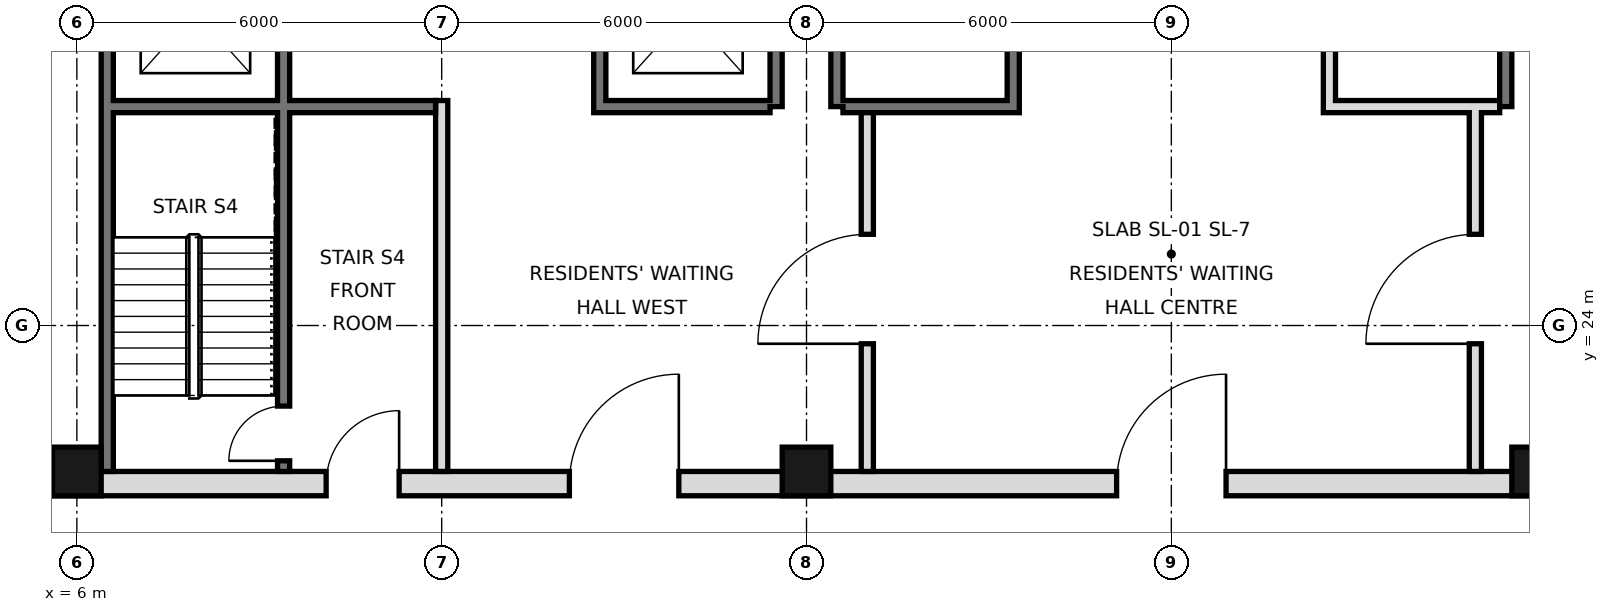
"""IFC4 building model, lengths in metres.
Left out: names, types, materials, properties, quantities, classifications, styles, units other than length and angle.
Written with IfcOpenShell. Run it as: python <this file> out.ifc"""

import sys

from ifc_helpers import new_model, si_unit, direction, frame, frame_2d, origin, origin_2d, place, context, subcontext, project, spatial, rectangle, hollow_rectangle, extrude, element, fill, save


model = new_model("IFC4")
c1 = context("Model", 3, precision=1e-05, world=origin(), true_north=direction((0.0, 1.0)))
c2 = subcontext(c1, "Body", "Model", "MODEL_VIEW")
j1 = project(units=[si_unit("LENGTHUNIT", "METRE"), si_unit("PLANEANGLEUNIT", "RADIAN")], contexts=[c1])
p1 = place(None, origin())
s1 = spatial("IfcSite", under=j1, at=p1, CompositionType="ELEMENT")
p2 = place(p1, origin())
s2 = spatial("IfcBuilding", under=s1, at=p2, CompositionType="ELEMENT")
p3 = place(p2, frame((0.0, 0.0, 130.4)))
s3 = spatial("IfcBuildingStorey", under=s2, at=p3, CompositionType="ELEMENT", Elevation=130.4)
for number, where, z_axis, x_axis in (
    (1, (6.0, 21.6, 0.0), (0.0, 0.0, 1.0), (1.0, 0.0, 0.0)),
    (2, (18.0, 21.6, 0.0), (0.0, 0.0, 1.0), (1.0, 0.0, 0.0)),
    (3, (30.0, 21.6, 0.0), (0.0, 0.0, 1.0), (1.0, 0.0, 0.0)),
):
    element("IfcColumn", number, at=place(p3, frame(where, z_axis=z_axis, x_axis=x_axis)), inside=s3, PredefinedType="COLUMN", context=c2, shape_type="SweptSolid", body=[
        extrude(hollow_rectangle(XDim=0.8, YDim=0.8, WallThickness=0.05, at=origin_2d()), origin(), (0.0, 0.0, 1.0), 3.6),
    ])
p4 = place(p3, frame((6.5, 21.6, 0.0), z_axis=(0.0, 0.0, 1.0), x_axis=(0.0, 1.0, 0.0)))
e4 = element("IfcWall", 4, at=p4, inside=s3, PredefinedType="SOLIDWALL", context=c2, shape_type="SweptSolid", body=[
    extrude(rectangle(XDim=23.5, YDim=0.2, at=frame_2d((11.75, 0.0))), origin(), (0.0, 0.0, 1.0), 3.42),
])
for number, where, z_axis, x_axis in (
    (5, (17.5, 27.6, 0.0), (0.0, 0.0, 1.0), (0.0, 1.0, 0.0)),
    (6, (18.5, 27.6, 0.0), (0.0, 0.0, 1.0), (0.0, 1.0, 0.0)),
    (7, (29.5, 27.6, 0.0), (0.0, 0.0, 1.0), (0.0, 1.0, 0.0)),
):
    element("IfcWall", number, at=place(p3, frame(where, z_axis=z_axis, x_axis=x_axis)), inside=s3, PredefinedType="SOLIDWALL", context=c2, shape_type="SweptSolid", body=[
        extrude(rectangle(XDim=17.5, YDim=0.2, at=frame_2d((8.75, 0.0))), origin(), (0.0, 0.0, 1.0), 3.42),
    ])
p5 = place(p3, frame((5.6, 21.4, 0.0), z_axis=(0.0, 0.0, 1.0), x_axis=(1.0, 0.0, 0.0)))
e8 = element("IfcWall", 8, at=p5, inside=s3, PredefinedType="SOLIDWALL", context=c2, shape_type="SweptSolid", body=[
    extrude(rectangle(XDim=36.8, YDim=0.4, at=frame_2d((18.4, 0.0))), origin(), (0.0, 0.0, 1.0), 3.42),
])
p6 = place(p5, frame((8.5, 0.0, 0.0)))
e9 = element("IfcOpeningElement", 9, at=p6, cuts=e8, PredefinedType="OPENING", context=c2, shape_type="SweptSolid", body=[
    extrude(rectangle(XDim=1.8, YDim=2.1, at=frame_2d((0.9, 1.05))), frame((0.0, 0.21, 0.0), z_axis=(0.0, -1.0, 0.0), x_axis=(1.0, 0.0, 0.0)), (0.0, 0.0, 1.0), 0.42),
])
p7 = place(p5, frame((17.5, 0.0, 0.0)))
e10 = element("IfcOpeningElement", 10, at=p7, cuts=e8, PredefinedType="OPENING", context=c2, shape_type="SweptSolid", body=[
    extrude(rectangle(XDim=1.8, YDim=2.1, at=frame_2d((0.9, 1.05))), frame((0.0, 0.21, 0.0), z_axis=(0.0, -1.0, 0.0), x_axis=(1.0, 0.0, 0.0)), (0.0, 0.0, 1.0), 0.42),
])
p8 = place(p5, frame((26.5, 0.0, 0.0)))
e11 = element("IfcOpeningElement", 11, at=p8, cuts=e8, PredefinedType="OPENING", context=c2, shape_type="SweptSolid", body=[
    extrude(rectangle(XDim=1.8, YDim=2.1, at=frame_2d((0.9, 1.05))), frame((0.0, 0.21, 0.0), z_axis=(0.0, -1.0, 0.0), x_axis=(1.0, 0.0, 0.0)), (0.0, 0.0, 1.0), 0.42),
])
p9 = place(p5, frame((4.5, 0.0, 0.0)))
e12 = element("IfcOpeningElement", 12, at=p9, cuts=e8, PredefinedType="OPENING", context=c2, shape_type="SweptSolid", body=[
    extrude(rectangle(XDim=1.2, YDim=2.1, at=frame_2d((0.6, 1.05))), frame((0.0, 0.21, 0.0), z_axis=(0.0, -1.0, 0.0), x_axis=(1.0, 0.0, 0.0)), (0.0, 0.0, 1.0), 0.42),
])
p10 = place(p5, frame((31.1, 0.0, 0.0)))
e13 = element("IfcOpeningElement", 13, at=p10, cuts=e8, PredefinedType="OPENING", context=c2, shape_type="SweptSolid", body=[
    extrude(rectangle(XDim=1.2, YDim=2.1, at=frame_2d((0.6, 1.05))), frame((0.0, 0.21, 0.0), z_axis=(0.0, -1.0, 0.0), x_axis=(1.0, 0.0, 0.0)), (0.0, 0.0, 1.0), 0.42),
])
p11 = place(p3, frame((19.0, 21.6, 0.0), z_axis=(0.0, 0.0, 1.0), x_axis=(0.0, 1.0, 0.0)))
e14 = element("IfcWall", 14, at=p11, inside=s3, PredefinedType="PARTITIONING", context=c2, shape_type="SweptSolid", body=[
    extrude(rectangle(XDim=6.0, YDim=0.2, at=frame_2d((3.0, 0.0))), origin(), (0.0, 0.0, 1.0), 3.42),
])
p12 = place(p11, frame((2.1, 0.0, 0.0)))
e15 = element("IfcOpeningElement", 15, at=p12, cuts=e14, PredefinedType="OPENING", context=c2, shape_type="SweptSolid", body=[
    extrude(rectangle(XDim=1.8, YDim=2.1, at=frame_2d((0.9, 1.05))), frame((0.0, 0.11, 0.0), z_axis=(0.0, -1.0, 0.0), x_axis=(1.0, 0.0, 0.0)), (0.0, 0.0, 1.0), 0.22),
])
p13 = place(p3, frame((29.0, 21.6, 0.0), z_axis=(0.0, 0.0, 1.0), x_axis=(0.0, 1.0, 0.0)))
e16 = element("IfcWall", 16, at=p13, inside=s3, PredefinedType="PARTITIONING", context=c2, shape_type="SweptSolid", body=[
    extrude(rectangle(XDim=6.0, YDim=0.2, at=frame_2d((3.0, 0.0))), origin(), (0.0, 0.0, 1.0), 3.42),
])
p14 = place(p13, frame((2.1, 0.0, 0.0)))
e17 = element("IfcOpeningElement", 17, at=p14, cuts=e16, PredefinedType="OPENING", context=c2, shape_type="SweptSolid", body=[
    extrude(rectangle(XDim=1.8, YDim=2.1, at=frame_2d((0.9, 1.05))), frame((0.0, 0.11, 0.0), z_axis=(0.0, -1.0, 0.0), x_axis=(1.0, 0.0, 0.0)), (0.0, 0.0, 1.0), 0.22),
])
p15 = place(p3, frame((12.0, 21.6, 0.0), z_axis=(0.0, 0.0, 1.0), x_axis=(0.0, 1.0, 0.0)))
e18 = element("IfcWall", 18, at=p15, inside=s3, PredefinedType="PARTITIONING", context=c2, shape_type="SweptSolid", body=[
    extrude(rectangle(XDim=6.1, YDim=0.2, at=frame_2d((3.05, 0.0))), origin(), (0.0, 0.0, 1.0), 3.42),
])
p16 = place(p3, frame((14.6, 27.5, 0.0), z_axis=(0.0, 0.0, 1.0), x_axis=(0.0, 1.0, 0.0)))
e19 = element("IfcWall", 19, at=p16, inside=s3, PredefinedType="SOLIDWALL", context=c2, shape_type="SweptSolid", body=[
    extrude(rectangle(XDim=17.5, YDim=0.2, at=frame_2d((8.75, 0.0))), origin(), (0.0, 0.0, 1.0), 3.42),
])
p17 = place(p16, frame((1.1, 0.0, 0.0)))
e20 = element("IfcOpeningElement", 20, at=p17, cuts=e19, PredefinedType="OPENING", context=c2, shape_type="SweptSolid", body=[
    extrude(rectangle(XDim=1.1, YDim=2.1, at=frame_2d((0.55, 1.05))), frame((0.0, 0.11, 0.0), z_axis=(0.0, -1.0, 0.0), x_axis=(1.0, 0.0, 0.0)), (0.0, 0.0, 1.0), 0.22),
])
p18 = place(p16, frame((4.2, 0.0, 0.0)))
e21 = element("IfcOpeningElement", 21, at=p18, cuts=e19, PredefinedType="OPENING", context=c2, shape_type="SweptSolid", body=[
    extrude(rectangle(XDim=1.1, YDim=2.1, at=frame_2d((0.55, 1.05))), frame((0.0, 0.11, 0.0), z_axis=(0.0, -1.0, 0.0), x_axis=(1.0, 0.0, 0.0)), (0.0, 0.0, 1.0), 0.22),
])
p19 = place(p16, frame((15.4, 0.0, 0.0)))
e22 = element("IfcOpeningElement", 22, at=p19, cuts=e19, PredefinedType="OPENING", context=c2, shape_type="SweptSolid", body=[
    extrude(rectangle(XDim=1.1, YDim=2.1, at=frame_2d((0.55, 1.05))), frame((0.0, 0.11, 0.0), z_axis=(0.0, -1.0, 0.0), x_axis=(1.0, 0.0, 0.0)), (0.0, 0.0, 1.0), 0.22),
])
p20 = place(p16, frame((9.9, 0.0, 0.0)))
e23 = element("IfcOpeningElement", 23, at=p20, cuts=e19, PredefinedType="OPENING", context=c2, shape_type="SweptSolid", body=[
    extrude(rectangle(XDim=0.9, YDim=2.1, at=frame_2d((0.45, 1.05))), frame((0.0, 0.11, 0.0), z_axis=(0.0, -1.0, 0.0), x_axis=(1.0, 0.0, 0.0)), (0.0, 0.0, 1.0), 0.22),
])
p21 = place(p3, frame((21.4, 27.5, 0.0), z_axis=(0.0, 0.0, 1.0), x_axis=(0.0, 1.0, 0.0)))
e24 = element("IfcWall", 24, at=p21, inside=s3, PredefinedType="SOLIDWALL", context=c2, shape_type="SweptSolid", body=[
    extrude(rectangle(XDim=17.5, YDim=0.2, at=frame_2d((8.75, 0.0))), origin(), (0.0, 0.0, 1.0), 3.42),
])
p22 = place(p21, frame((16.2, 0.0, 0.0)))
e25 = element("IfcOpeningElement", 25, at=p22, cuts=e24, PredefinedType="OPENING", context=c2, shape_type="SweptSolid", body=[
    extrude(rectangle(XDim=1.0, YDim=2.1, at=frame_2d((0.5, 1.05))), frame((0.0, 0.11, 0.0), z_axis=(0.0, -1.0, 0.0), x_axis=(1.0, 0.0, 0.0)), (0.0, 0.0, 1.0), 0.22),
])
p23 = place(p21, frame((7.4, 0.0, 0.0)))
e26 = element("IfcOpeningElement", 26, at=p23, cuts=e24, PredefinedType="OPENING", context=c2, shape_type="SweptSolid", body=[
    extrude(rectangle(XDim=0.9, YDim=2.1, at=frame_2d((0.45, 1.05))), frame((0.0, 0.11, 0.0), z_axis=(0.0, -1.0, 0.0), x_axis=(1.0, 0.0, 0.0)), (0.0, 0.0, 1.0), 0.22),
])
p24 = place(p3, frame((26.6, 27.5, 0.0), z_axis=(0.0, 0.0, 1.0), x_axis=(0.0, 1.0, 0.0)))
e27 = element("IfcWall", 27, at=p24, inside=s3, PredefinedType="SOLIDWALL", context=c2, shape_type="SweptSolid", body=[
    extrude(rectangle(XDim=17.5, YDim=0.2, at=frame_2d((8.75, 0.0))), origin(), (0.0, 0.0, 1.0), 3.42),
])
p25 = place(p24, frame((4.3, 0.0, 0.0)))
e28 = element("IfcOpeningElement", 28, at=p25, cuts=e27, PredefinedType="OPENING", context=c2, shape_type="SweptSolid", body=[
    extrude(rectangle(XDim=0.9, YDim=2.1, at=frame_2d((0.45, 1.05))), frame((0.0, 0.11, 0.0), z_axis=(0.0, -1.0, 0.0), x_axis=(1.0, 0.0, 0.0)), (0.0, 0.0, 1.0), 0.22),
])
p26 = place(p24, frame((10.35, 0.0, 0.0)))
e29 = element("IfcOpeningElement", 29, at=p26, cuts=e27, PredefinedType="OPENING", context=c2, shape_type="SweptSolid", body=[
    extrude(rectangle(XDim=1.0, YDim=2.1, at=frame_2d((0.5, 1.05))), frame((0.0, 0.11, 0.0), z_axis=(0.0, -1.0, 0.0), x_axis=(1.0, 0.0, 0.0)), (0.0, 0.0, 1.0), 0.22),
])
p27 = place(p24, frame((15.475, 0.0, 0.0)))
e30 = element("IfcOpeningElement", 30, at=p27, cuts=e27, PredefinedType="OPENING", context=c2, shape_type="SweptSolid", body=[
    extrude(rectangle(XDim=1.0, YDim=2.1, at=frame_2d((0.5, 1.05))), frame((0.0, 0.11, 0.0), z_axis=(0.0, -1.0, 0.0), x_axis=(1.0, 0.0, 0.0)), (0.0, 0.0, 1.0), 0.22),
])
p28 = place(p3, frame((9.4, 21.6, 0.0), z_axis=(0.0, 0.0, 1.0), x_axis=(0.0, 1.0, 0.0)))
e31 = element("IfcWall", 31, at=p28, inside=s3, PredefinedType="SOLIDWALL", context=c2, shape_type="SweptSolid", body=[
    extrude(rectangle(XDim=23.4, YDim=0.2, at=frame_2d((11.7, 0.0))), origin(), (0.0, 0.0, 1.0), 3.42),
])
p29 = place(p28, frame((7.0, 0.0, 0.0)))
e32 = element("IfcOpeningElement", 32, at=p29, cuts=e31, PredefinedType="OPENING", context=c2, shape_type="SweptSolid", body=[
    extrude(rectangle(XDim=1.1, YDim=2.1, at=frame_2d((0.55, 1.05))), frame((0.0, 0.11, 0.0), z_axis=(0.0, -1.0, 0.0), x_axis=(1.0, 0.0, 0.0)), (0.0, 0.0, 1.0), 0.22),
])
p30 = place(p28, frame((10.1, 0.0, 0.0)))
e33 = element("IfcOpeningElement", 33, at=p30, cuts=e31, PredefinedType="OPENING", context=c2, shape_type="SweptSolid", body=[
    extrude(rectangle(XDim=1.1, YDim=2.1, at=frame_2d((0.55, 1.05))), frame((0.0, 0.11, 0.0), z_axis=(0.0, -1.0, 0.0), x_axis=(1.0, 0.0, 0.0)), (0.0, 0.0, 1.0), 0.22),
])
p31 = place(p28, frame((13.2, 0.0, 0.0)))
e34 = element("IfcOpeningElement", 34, at=p31, cuts=e31, PredefinedType="OPENING", context=c2, shape_type="SweptSolid", body=[
    extrude(rectangle(XDim=1.1, YDim=2.1, at=frame_2d((0.55, 1.05))), frame((0.0, 0.11, 0.0), z_axis=(0.0, -1.0, 0.0), x_axis=(1.0, 0.0, 0.0)), (0.0, 0.0, 1.0), 0.22),
])
p32 = place(p28, frame((22.1, 0.0, 0.0)))
e35 = element("IfcOpeningElement", 35, at=p32, cuts=e31, PredefinedType="OPENING", context=c2, shape_type="SweptSolid", body=[
    extrude(rectangle(XDim=1.0, YDim=2.1, at=frame_2d((0.5, 1.05))), frame((0.0, 0.11, 0.0), z_axis=(0.0, -1.0, 0.0), x_axis=(1.0, 0.0, 0.0)), (0.0, 0.0, 1.0), 0.22),
])
p33 = place(p28, frame((0.175, 0.0, 0.0)))
e36 = element("IfcOpeningElement", 36, at=p33, cuts=e31, PredefinedType="OPENING", context=c2, shape_type="SweptSolid", body=[
    extrude(rectangle(XDim=0.9, YDim=2.1, at=frame_2d((0.45, 1.05))), frame((0.0, 0.11, 0.0), z_axis=(0.0, -1.0, 0.0), x_axis=(1.0, 0.0, 0.0)), (0.0, 0.0, 1.0), 0.22),
])
for number, where, z_axis, x_axis in (
    (37, (14.7, 27.6, 0.0), (0.0, 0.0, 1.0), (1.0, 0.0, 0.0)),
    (38, (18.6, 27.6, 0.0), (0.0, 0.0, 1.0), (1.0, 0.0, 0.0)),
    (39, (26.7, 27.6, 0.0), (0.0, 0.0, 1.0), (1.0, 0.0, 0.0)),
):
    element("IfcWall", number, at=place(p3, frame(where, z_axis=z_axis, x_axis=x_axis)), inside=s3, PredefinedType="SOLIDWALL", context=c2, shape_type="SweptSolid", body=[
        extrude(rectangle(XDim=2.7, YDim=0.2, at=frame_2d((1.35, 0.0))), origin(), (0.0, 0.0, 1.0), 3.42),
    ])
p34 = place(p3, frame((6.6, 27.6, 0.0), z_axis=(0.0, 0.0, 1.0), x_axis=(1.0, 0.0, 0.0)))
e40 = element("IfcWall", 40, at=p34, inside=s3, PredefinedType="SOLIDWALL", context=c2, shape_type="SweptSolid", body=[
    extrude(rectangle(XDim=5.3, YDim=0.2, at=frame_2d((2.65, 0.0))), origin(), (0.0, 0.0, 1.0), 3.42),
])
p35 = place(p6, frame((1.8, 0.0, 0.0), z_axis=(0.0, 0.0, 1.0), x_axis=(-1.0, 0.0, 0.0)))
e41 = element("IfcDoor", 41, at=p35, inside=s3, OperationType="SINGLE_SWING_LEFT", PredefinedType="DOOR", context=c2, shape_type="SweptSolid", body=[
    extrude(rectangle(XDim=1.8, YDim=2.1, at=frame_2d((0.9, 1.05))), frame((0.0, 0.025, 0.0), z_axis=(0.0, -1.0, 0.0), x_axis=(1.0, 0.0, 0.0)), (0.0, 0.0, 1.0), 0.05),
])
fill(e9, e41)
p36 = place(p12, origin())
e42 = element("IfcDoor", 42, at=p36, inside=s3, OperationType="SINGLE_SWING_LEFT", PredefinedType="DOOR", context=c2, shape_type="SweptSolid", body=[
    extrude(rectangle(XDim=1.8, YDim=2.1, at=frame_2d((0.9, 1.05))), frame((0.0, 0.025, 0.0), z_axis=(0.0, -1.0, 0.0), x_axis=(1.0, 0.0, 0.0)), (0.0, 0.0, 1.0), 0.05),
])
fill(e15, e42)
p37 = place(p7, frame((1.8, 0.0, 0.0), z_axis=(0.0, 0.0, 1.0), x_axis=(-1.0, 0.0, 0.0)))
e43 = element("IfcDoor", 43, at=p37, inside=s3, OperationType="SINGLE_SWING_LEFT", PredefinedType="DOOR", context=c2, shape_type="SweptSolid", body=[
    extrude(rectangle(XDim=1.8, YDim=2.1, at=frame_2d((0.9, 1.05))), frame((0.0, 0.025, 0.0), z_axis=(0.0, -1.0, 0.0), x_axis=(1.0, 0.0, 0.0)), (0.0, 0.0, 1.0), 0.05),
])
fill(e10, e43)
p38 = place(p14, origin())
e44 = element("IfcDoor", 44, at=p38, inside=s3, OperationType="SINGLE_SWING_LEFT", PredefinedType="DOOR", context=c2, shape_type="SweptSolid", body=[
    extrude(rectangle(XDim=1.8, YDim=2.1, at=frame_2d((0.9, 1.05))), frame((0.0, 0.025, 0.0), z_axis=(0.0, -1.0, 0.0), x_axis=(1.0, 0.0, 0.0)), (0.0, 0.0, 1.0), 0.05),
])
fill(e17, e44)
p39 = place(p9, frame((1.2, 0.0, 0.0), z_axis=(0.0, 0.0, 1.0), x_axis=(-1.0, 0.0, 0.0)))
e45 = element("IfcDoor", 45, at=p39, inside=s3, OperationType="SINGLE_SWING_LEFT", PredefinedType="DOOR", context=c2, shape_type="SweptSolid", body=[
    extrude(rectangle(XDim=1.2, YDim=2.1, at=frame_2d((0.6, 1.05))), frame((0.0, 0.025, 0.0), z_axis=(0.0, -1.0, 0.0), x_axis=(1.0, 0.0, 0.0)), (0.0, 0.0, 1.0), 0.05),
])
fill(e12, e45)
p40 = place(p33, origin())
e46 = element("IfcDoor", 46, at=p40, inside=s3, OperationType="SINGLE_SWING_LEFT", PredefinedType="DOOR", context=c2, shape_type="SweptSolid", body=[
    extrude(rectangle(XDim=0.9, YDim=2.1, at=frame_2d((0.45, 1.05))), frame((0.0, 0.025, 0.0), z_axis=(0.0, -1.0, 0.0), x_axis=(1.0, 0.0, 0.0)), (0.0, 0.0, 1.0), 0.05),
])
fill(e36, e46)
save(model, sys.argv[1])
